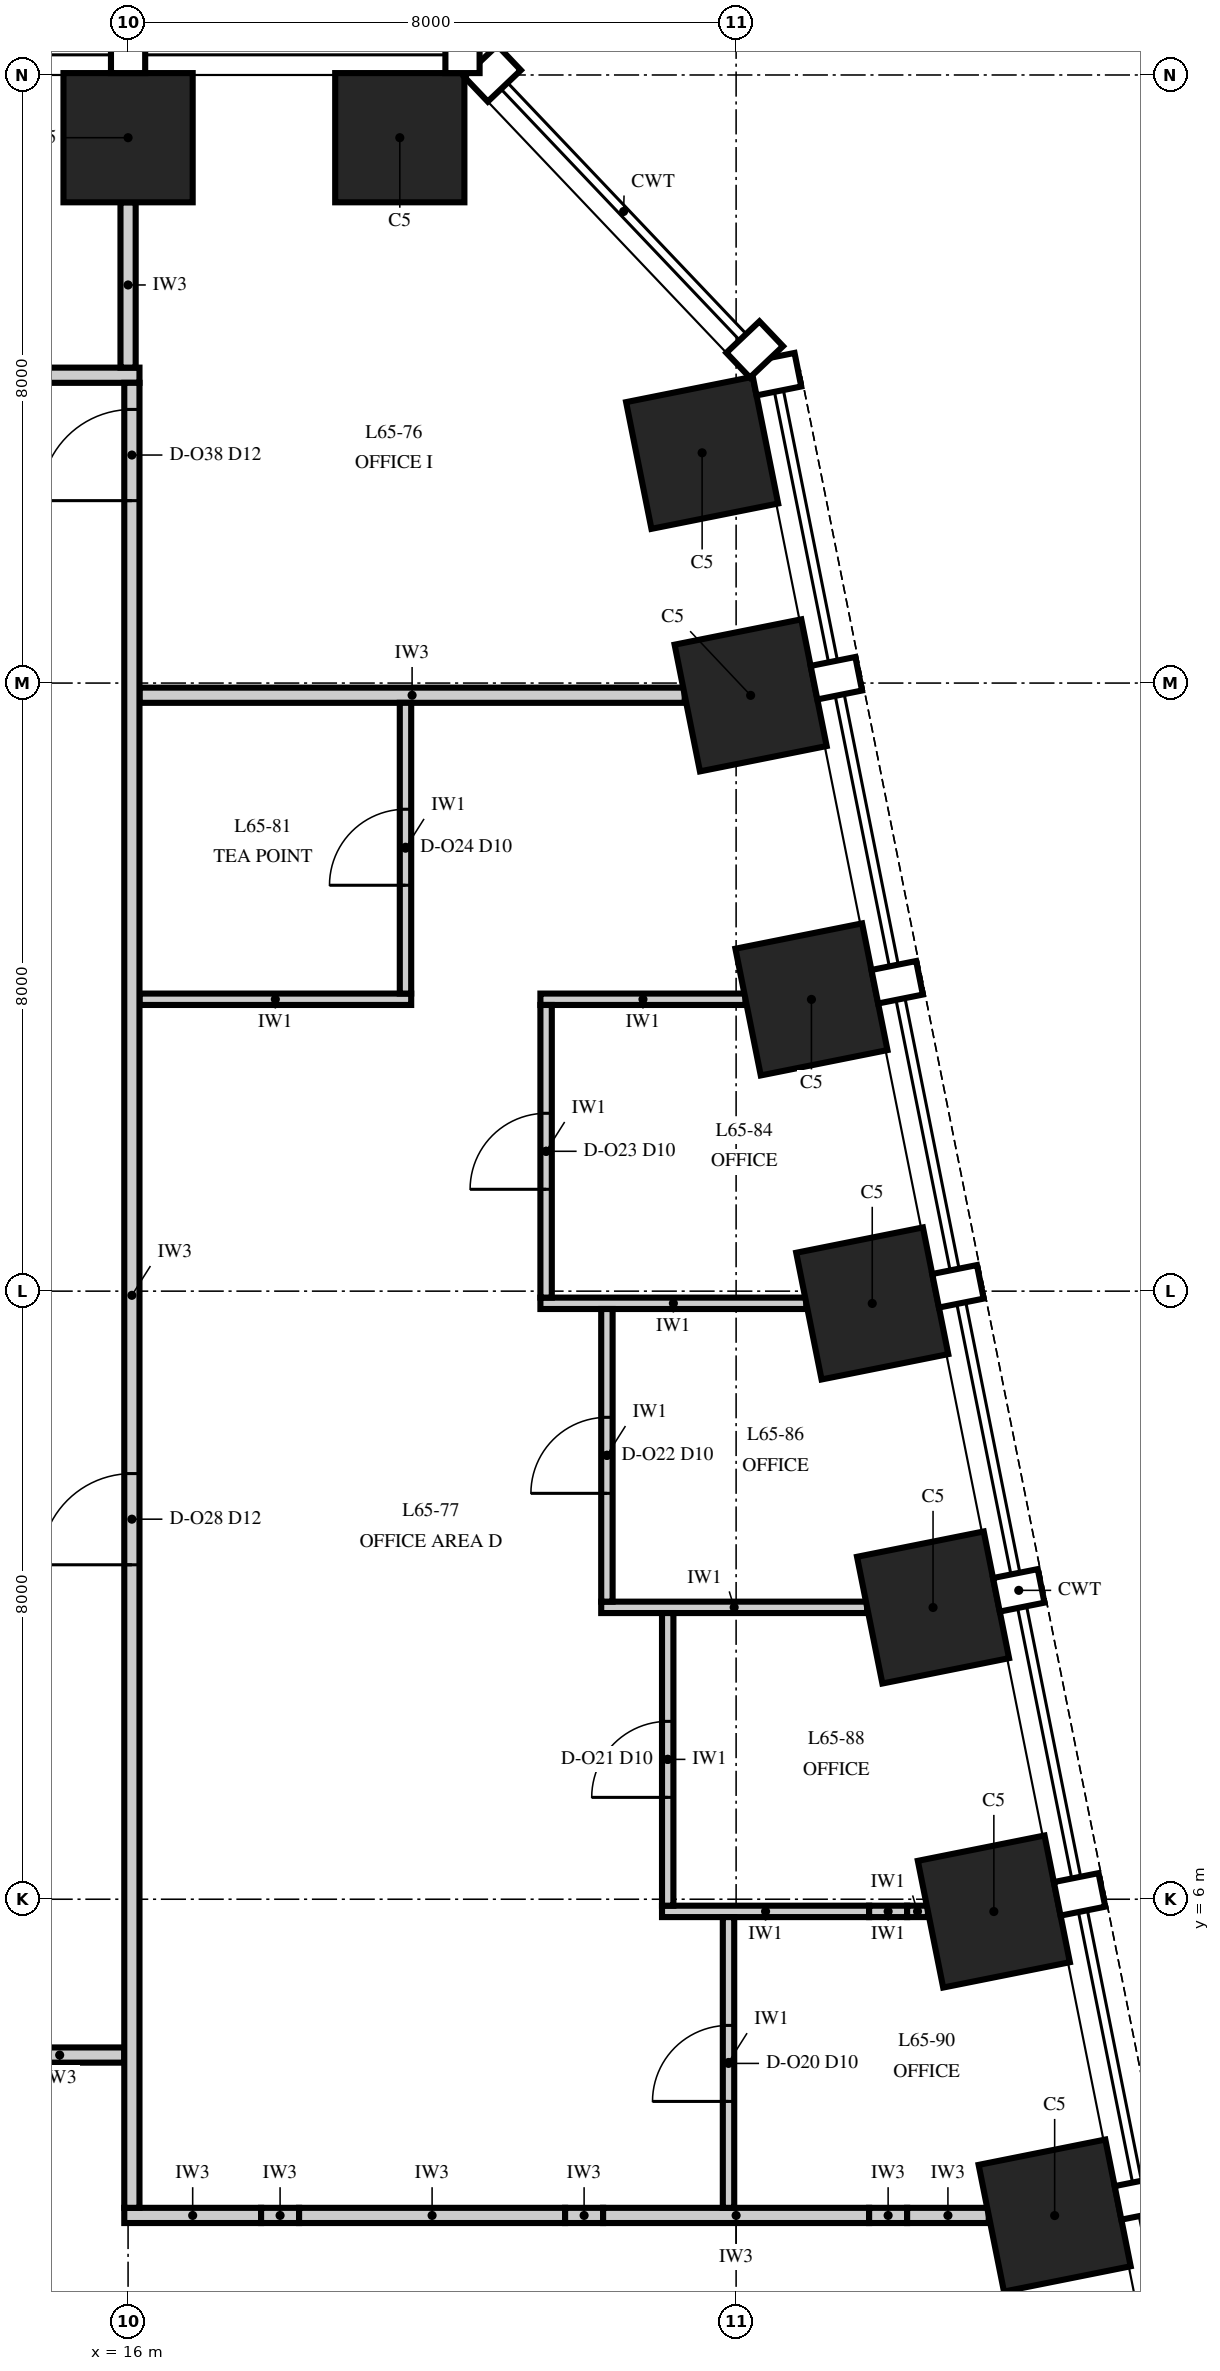
"""IFC4 building model, lengths in metres.
Left out: names, types, materials, properties, quantities, classifications, styles, units other than length and angle.
Written with IfcOpenShell. Run it as: python <this file> out.ifc"""

import sys

from ifc_helpers import new_model, si_unit, direction, frame, frame_2d, origin, origin_2d, place, context, subcontext, project, spatial, rectangle, extrude, element, fill, save


model = new_model("IFC4")
c1 = context("Model", 3, precision=1e-05, world=origin(), true_north=direction((0.0, 1.0)))
c2 = subcontext(c1, "Body", "Model", "MODEL_VIEW")
j1 = project(units=[si_unit("LENGTHUNIT", "METRE"), si_unit("PLANEANGLEUNIT", "RADIAN")], contexts=[c1])
p1 = place(None, origin())
s1 = spatial("IfcSite", under=j1, at=p1, CompositionType="ELEMENT")
p2 = place(p1, origin())
s2 = spatial("IfcBuilding", under=s1, at=p2, CompositionType="ELEMENT")
p3 = place(p2, frame((0.0, 0.0, 280.0)))
s3 = spatial("IfcBuildingStorey", under=s2, at=p3, CompositionType="ELEMENT", Elevation=280.0)
for number, where, z_axis, x_axis in (
    (1, (28.191, 1.838, 0.0), (0.0, 0.0, 1.0), (-0.196, 0.981, 0.0)),
    (2, (27.391, 5.838, 0.0), (0.0, 0.0, 1.0), (-0.196, 0.981, 0.0)),
    (3, (26.591, 9.838, 0.0), (0.0, 0.0, 1.0), (-0.196, 0.981, 0.0)),
    (4, (25.791, 13.838, 0.0), (0.0, 0.0, 1.0), (-0.196, 0.981, 0.0)),
    (5, (24.991, 17.838, 0.0), (0.0, 0.0, 1.0), (-0.196, 0.981, 0.0)),
    (6, (24.191, 21.838, 0.0), (0.0, 0.0, 1.0), (-0.196, 0.981, 0.0)),
    (7, (23.553, 25.029, 0.0), (0.0, 0.0, 1.0), (-0.196, 0.981, 0.0)),
    (8, (19.575, 29.175, 0.0), (0.0, 0.0, 1.0), (-1.0, 0.0, 0.0)),
    (9, (16.0, 29.175, 0.0), (0.0, 0.0, 1.0), (-1.0, 0.0, 0.0)),
):
    element("IfcColumn", number, at=place(p3, frame(where, z_axis=z_axis, x_axis=x_axis)), inside=s3, PredefinedType="COLUMN", context=c2, shape_type="SweptSolid", body=[
        extrude(rectangle(XDim=1.7, YDim=1.7, at=origin_2d()), origin(), (0.0, 0.0, 1.0), 4.0),
    ])
p4 = place(p3, frame((15.95, 1.84, 0.0), z_axis=(0.0, 0.0, 1.0), x_axis=(1.0, 0.0, 0.0)))
e10 = element("IfcWall", 10, at=p4, inside=s3, PredefinedType="PARTITIONING", context=c2, shape_type="SweptSolid", body=[
    extrude(rectangle(XDim=1.8, YDim=0.2, at=frame_2d((0.9, 0.0))), origin(), (0.0, 0.0, 1.0), 3.326),
])
p5 = place(p3, frame((17.75, 1.84, 0.0), z_axis=(0.0, 0.0, 1.0), x_axis=(1.0, 0.0, 0.0)))
e11 = element("IfcWall", 11, at=p5, inside=s3, PredefinedType="PARTITIONING", context=c2, shape_type="SweptSolid", body=[
    extrude(rectangle(XDim=0.5, YDim=0.2, at=frame_2d((0.25, 0.0))), origin(), (0.0, 0.0, 1.0), 2.25),
])
p6 = place(p3, frame((18.25, 1.84, 0.0), z_axis=(0.0, 0.0, 1.0), x_axis=(1.0, 0.0, 0.0)))
e12 = element("IfcWall", 12, at=p6, inside=s3, PredefinedType="PARTITIONING", context=c2, shape_type="SweptSolid", body=[
    extrude(rectangle(XDim=3.5, YDim=0.2, at=frame_2d((1.75, 0.0))), origin(), (0.0, 0.0, 1.0), 3.326),
])
p7 = place(p3, frame((21.75, 1.84, 0.0), z_axis=(0.0, 0.0, 1.0), x_axis=(1.0, 0.0, 0.0)))
e13 = element("IfcWall", 13, at=p7, inside=s3, PredefinedType="PARTITIONING", context=c2, shape_type="SweptSolid", body=[
    extrude(rectangle(XDim=0.5, YDim=0.2, at=frame_2d((0.25, 0.0))), origin(), (0.0, 0.0, 1.0), 2.25),
])
p8 = place(p3, frame((22.25, 1.84, 0.0), z_axis=(0.0, 0.0, 1.0), x_axis=(1.0, 0.0, 0.0)))
e14 = element("IfcWall", 14, at=p8, inside=s3, PredefinedType="PARTITIONING", context=c2, shape_type="SweptSolid", body=[
    extrude(rectangle(XDim=3.5, YDim=0.2, at=frame_2d((1.75, 0.0))), origin(), (0.0, 0.0, 1.0), 3.326),
])
p9 = place(p3, frame((25.75, 1.84, 0.0), z_axis=(0.0, 0.0, 1.0), x_axis=(1.0, 0.0, 0.0)))
e15 = element("IfcWall", 15, at=p9, inside=s3, PredefinedType="PARTITIONING", context=c2, shape_type="SweptSolid", body=[
    extrude(rectangle(XDim=0.5, YDim=0.2, at=frame_2d((0.25, 0.0))), origin(), (0.0, 0.0, 1.0), 2.25),
])
p10 = place(p3, frame((26.25, 1.84, 0.0), z_axis=(0.0, 0.0, 1.0), x_axis=(1.0, 0.0, 0.0)))
e16 = element("IfcWall", 16, at=p10, inside=s3, PredefinedType="PARTITIONING", context=c2, shape_type="SweptSolid", body=[
    extrude(rectangle(XDim=1.074, YDim=0.2, at=frame_2d((0.537, 0.0))), origin(), (0.0, 0.0, 1.0), 3.326),
])
p11 = place(p3, frame((14.25, 3.95, 0.0), z_axis=(0.0, 0.0, 1.0), x_axis=(1.0, 0.0, 0.0)))
e17 = element("IfcWall", 17, at=p11, inside=s3, PredefinedType="PARTITIONING", context=c2, shape_type="SweptSolid", body=[
    extrude(rectangle(XDim=1.7, YDim=0.2, at=frame_2d((0.85, 0.0))), origin(), (0.0, 0.0, 1.0), 3.85),
])
p12 = place(p3, frame((23.025, 5.84, 0.0), z_axis=(0.0, 0.0, 1.0), x_axis=(1.0, 0.0, 0.0)))
e18 = element("IfcWall", 18, at=p12, inside=s3, PredefinedType="PARTITIONING", context=c2, shape_type="SweptSolid", body=[
    extrude(rectangle(XDim=2.725, YDim=0.15, at=frame_2d((1.363, 0.0))), origin(), (0.0, 0.0, 1.0), 2.842),
])
p13 = place(p3, frame((25.75, 5.84, 0.0), z_axis=(0.0, 0.0, 1.0), x_axis=(1.0, 0.0, 0.0)))
e19 = element("IfcWall", 19, at=p13, inside=s3, PredefinedType="PARTITIONING", context=c2, shape_type="SweptSolid", body=[
    extrude(rectangle(XDim=0.5, YDim=0.15, at=frame_2d((0.25, 0.0))), origin(), (0.0, 0.0, 1.0), 2.25),
])
p14 = place(p3, frame((26.25, 5.84, 0.0), z_axis=(0.0, 0.0, 1.0), x_axis=(1.0, 0.0, 0.0)))
e20 = element("IfcWall", 20, at=p14, inside=s3, PredefinedType="PARTITIONING", context=c2, shape_type="SweptSolid", body=[
    extrude(rectangle(XDim=0.274, YDim=0.15, at=frame_2d((0.137, 0.0))), origin(), (0.0, 0.0, 1.0), 2.842),
])
for number, where, z_axis, x_axis in (
    (21, (22.225, 9.84, 0.0), (0.0, 0.0, 1.0), (1.0, 0.0, 0.0)),
    (22, (21.425, 13.84, 0.0), (0.0, 0.0, 1.0), (1.0, 0.0, 0.0)),
):
    element("IfcWall", number, at=place(p3, frame(where, z_axis=z_axis, x_axis=x_axis)), inside=s3, PredefinedType="PARTITIONING", context=c2, shape_type="SweptSolid", body=[
        extrude(rectangle(XDim=3.499, YDim=0.15, at=frame_2d((1.75, 0.0))), origin(), (0.0, 0.0, 1.0), 3.23),
    ])
p15 = place(p3, frame((16.15, 17.84, 0.0), z_axis=(0.0, 0.0, 1.0), x_axis=(1.0, 0.0, 0.0)))
e23 = element("IfcWall", 23, at=p15, inside=s3, PredefinedType="PARTITIONING", context=c2, shape_type="SweptSolid", body=[
    extrude(rectangle(XDim=3.575, YDim=0.15, at=frame_2d((1.788, 0.0))), origin(), (0.0, 0.0, 1.0), 3.23),
])
p16 = place(p3, frame((21.425, 17.84, 0.0), z_axis=(0.0, 0.0, 1.0), x_axis=(1.0, 0.0, 0.0)))
e24 = element("IfcWall", 24, at=p16, inside=s3, PredefinedType="PARTITIONING", context=c2, shape_type="SweptSolid", body=[
    extrude(rectangle(XDim=2.699, YDim=0.15, at=frame_2d((1.349, 0.0))), origin(), (0.0, 0.0, 1.0), 3.23),
])
p17 = place(p3, frame((16.15, 21.84, 0.0), z_axis=(0.0, 0.0, 1.0), x_axis=(1.0, 0.0, 0.0)))
e25 = element("IfcWall", 25, at=p17, inside=s3, PredefinedType="PARTITIONING", context=c2, shape_type="SweptSolid", body=[
    extrude(rectangle(XDim=7.174, YDim=0.2, at=frame_2d((3.587, 0.0))), origin(), (0.0, 0.0, 1.0), 3.23),
])
p18 = place(p3, frame((-16.15, 26.05, 0.0), z_axis=(0.0, 0.0, 1.0), x_axis=(1.0, 0.0, 0.0)))
e26 = element("IfcWall", 26, at=p18, inside=s3, PredefinedType="PARTITIONING", context=c2, shape_type="SweptSolid", body=[
    extrude(rectangle(XDim=32.3, YDim=0.2, at=frame_2d((16.15, 0.0))), origin(), (0.0, 0.0, 1.0), 3.418),
])
p19 = place(p18, frame((1.55, 0.0, 0.0)))
e27 = element("IfcOpeningElement", 27, at=p19, cuts=e26, PredefinedType="OPENING", context=c2, shape_type="SweptSolid", body=[
    extrude(rectangle(XDim=1.2, YDim=2.4, at=frame_2d((0.6, 1.2))), frame((0.0, 0.115, 0.0), z_axis=(0.0, -1.0, 0.0), x_axis=(1.0, 0.0, 0.0)), (0.0, 0.0, 1.0), 0.23),
])
p20 = place(p18, frame((5.55, 0.0, 0.0)))
e28 = element("IfcOpeningElement", 28, at=p20, cuts=e26, PredefinedType="OPENING", context=c2, shape_type="SweptSolid", body=[
    extrude(rectangle(XDim=1.2, YDim=2.4, at=frame_2d((0.6, 1.2))), frame((0.0, 0.115, 0.0), z_axis=(0.0, -1.0, 0.0), x_axis=(1.0, 0.0, 0.0)), (0.0, 0.0, 1.0), 0.23),
])
p21 = place(p18, frame((9.55, 0.0, 0.0)))
e29 = element("IfcOpeningElement", 29, at=p21, cuts=e26, PredefinedType="OPENING", context=c2, shape_type="SweptSolid", body=[
    extrude(rectangle(XDim=1.2, YDim=2.4, at=frame_2d((0.6, 1.2))), frame((0.0, 0.115, 0.0), z_axis=(0.0, -1.0, 0.0), x_axis=(1.0, 0.0, 0.0)), (0.0, 0.0, 1.0), 0.23),
])
p22 = place(p18, frame((13.55, 0.0, 0.0)))
e30 = element("IfcOpeningElement", 30, at=p22, cuts=e26, PredefinedType="OPENING", context=c2, shape_type="SweptSolid", body=[
    extrude(rectangle(XDim=1.2, YDim=2.4, at=frame_2d((0.6, 1.2))), frame((0.0, 0.115, 0.0), z_axis=(0.0, -1.0, 0.0), x_axis=(1.0, 0.0, 0.0)), (0.0, 0.0, 1.0), 0.23),
])
p23 = place(p18, frame((17.55, 0.0, 0.0)))
e31 = element("IfcOpeningElement", 31, at=p23, cuts=e26, PredefinedType="OPENING", context=c2, shape_type="SweptSolid", body=[
    extrude(rectangle(XDim=1.2, YDim=2.4, at=frame_2d((0.6, 1.2))), frame((0.0, 0.115, 0.0), z_axis=(0.0, -1.0, 0.0), x_axis=(1.0, 0.0, 0.0)), (0.0, 0.0, 1.0), 0.23),
])
p24 = place(p18, frame((21.55, 0.0, 0.0)))
e32 = element("IfcOpeningElement", 32, at=p24, cuts=e26, PredefinedType="OPENING", context=c2, shape_type="SweptSolid", body=[
    extrude(rectangle(XDim=1.2, YDim=2.4, at=frame_2d((0.6, 1.2))), frame((0.0, 0.115, 0.0), z_axis=(0.0, -1.0, 0.0), x_axis=(1.0, 0.0, 0.0)), (0.0, 0.0, 1.0), 0.23),
])
p25 = place(p18, frame((25.55, 0.0, 0.0)))
e33 = element("IfcOpeningElement", 33, at=p25, cuts=e26, PredefinedType="OPENING", context=c2, shape_type="SweptSolid", body=[
    extrude(rectangle(XDim=1.2, YDim=2.4, at=frame_2d((0.6, 1.2))), frame((0.0, 0.115, 0.0), z_axis=(0.0, -1.0, 0.0), x_axis=(1.0, 0.0, 0.0)), (0.0, 0.0, 1.0), 0.23),
])
p26 = place(p18, frame((29.55, 0.0, 0.0)))
e34 = element("IfcOpeningElement", 34, at=p26, cuts=e26, PredefinedType="OPENING", context=c2, shape_type="SweptSolid", body=[
    extrude(rectangle(XDim=1.2, YDim=2.4, at=frame_2d((0.6, 1.2))), frame((0.0, 0.115, 0.0), z_axis=(0.0, -1.0, 0.0), x_axis=(1.0, 0.0, 0.0)), (0.0, 0.0, 1.0), 0.23),
])
p27 = place(p3, frame((16.0, 26.15, 0.0), z_axis=(0.0, 0.0, 1.0), x_axis=(0.0, 1.0, 0.0)))
e35 = element("IfcWall", 35, at=p27, inside=s3, PredefinedType="PARTITIONING", context=c2, shape_type="SweptSolid", body=[
    extrude(rectangle(XDim=2.175, YDim=0.2, at=frame_2d((1.087, 0.0))), origin(), (0.0, 0.0, 1.0), 3.418),
])
p28 = place(p3, frame((16.05, 1.94, 0.0), z_axis=(0.0, 0.0, 1.0), x_axis=(0.0, 1.0, 0.0)))
e36 = element("IfcWall", 36, at=p28, inside=s3, PredefinedType="PARTITIONING", context=c2, shape_type="SweptSolid", body=[
    extrude(rectangle(XDim=24.01, YDim=0.2, at=frame_2d((12.005, 0.0))), origin(), (0.0, 0.0, 1.0), 2.842),
])
p29 = place(p28, frame((8.46, 0.0, 0.0)))
e37 = element("IfcOpeningElement", 37, at=p29, cuts=e36, PredefinedType="OPENING", context=c2, shape_type="SweptSolid", body=[
    extrude(rectangle(XDim=1.2, YDim=2.4, at=frame_2d((0.6, 1.2))), frame((0.0, 0.115, 0.0), z_axis=(0.0, -1.0, 0.0), x_axis=(1.0, 0.0, 0.0)), (0.0, 0.0, 1.0), 0.23),
])
p30 = place(p28, frame((22.46, 0.0, 0.0)))
e38 = element("IfcOpeningElement", 38, at=p30, cuts=e36, PredefinedType="OPENING", context=c2, shape_type="SweptSolid", body=[
    extrude(rectangle(XDim=1.2, YDim=2.4, at=frame_2d((0.6, 1.2))), frame((0.0, 0.115, 0.0), z_axis=(0.0, -1.0, 0.0), x_axis=(1.0, 0.0, 0.0)), (0.0, 0.0, 1.0), 0.23),
])
p31 = place(p3, frame((19.65, 17.915, 0.0), z_axis=(0.0, 0.0, 1.0), x_axis=(0.0, 1.0, 0.0)))
e39 = element("IfcWall", 39, at=p31, inside=s3, PredefinedType="PARTITIONING", context=c2, shape_type="SweptSolid", body=[
    extrude(rectangle(XDim=3.825, YDim=0.15, at=frame_2d((1.913, 0.0))), origin(), (0.0, 0.0, 1.0), 3.23),
])
p32 = place(p31, frame((1.425, 0.0, 0.0)))
e40 = element("IfcOpeningElement", 40, at=p32, cuts=e39, PredefinedType="OPENING", context=c2, shape_type="SweptSolid", body=[
    extrude(rectangle(XDim=1.0, YDim=2.3, at=frame_2d((0.5, 1.15))), frame((0.0, 0.09, 0.0), z_axis=(0.0, -1.0, 0.0), x_axis=(1.0, 0.0, 0.0)), (0.0, 0.0, 1.0), 0.18),
])
p33 = place(p3, frame((21.5, 13.915, 0.0), z_axis=(0.0, 0.0, 1.0), x_axis=(0.0, 1.0, 0.0)))
e41 = element("IfcWall", 41, at=p33, inside=s3, PredefinedType="PARTITIONING", context=c2, shape_type="SweptSolid", body=[
    extrude(rectangle(XDim=3.85, YDim=0.15, at=frame_2d((1.925, 0.0))), origin(), (0.0, 0.0, 1.0), 3.23),
])
p34 = place(p33, frame((1.425, 0.0, 0.0)))
e42 = element("IfcOpeningElement", 42, at=p34, cuts=e41, PredefinedType="OPENING", context=c2, shape_type="SweptSolid", body=[
    extrude(rectangle(XDim=1.0, YDim=2.3, at=frame_2d((0.5, 1.15))), frame((0.0, 0.09, 0.0), z_axis=(0.0, -1.0, 0.0), x_axis=(1.0, 0.0, 0.0)), (0.0, 0.0, 1.0), 0.18),
])
p35 = place(p3, frame((22.3, 9.915, 0.0), z_axis=(0.0, 0.0, 1.0), x_axis=(0.0, 1.0, 0.0)))
e43 = element("IfcWall", 43, at=p35, inside=s3, PredefinedType="PARTITIONING", context=c2, shape_type="SweptSolid", body=[
    extrude(rectangle(XDim=3.85, YDim=0.15, at=frame_2d((1.925, 0.0))), origin(), (0.0, 0.0, 1.0), 3.85),
])
p36 = place(p35, frame((1.425, 0.0, 0.0)))
e44 = element("IfcOpeningElement", 44, at=p36, cuts=e43, PredefinedType="OPENING", context=c2, shape_type="SweptSolid", body=[
    extrude(rectangle(XDim=1.0, YDim=2.3, at=frame_2d((0.5, 1.15))), frame((0.0, 0.09, 0.0), z_axis=(0.0, -1.0, 0.0), x_axis=(1.0, 0.0, 0.0)), (0.0, 0.0, 1.0), 0.18),
])
p37 = place(p3, frame((23.1, 5.915, 0.0), z_axis=(0.0, 0.0, 1.0), x_axis=(0.0, 1.0, 0.0)))
e45 = element("IfcWall", 45, at=p37, inside=s3, PredefinedType="PARTITIONING", context=c2, shape_type="SweptSolid", body=[
    extrude(rectangle(XDim=3.85, YDim=0.15, at=frame_2d((1.925, 0.0))), origin(), (0.0, 0.0, 1.0), 2.842),
])
p38 = place(p37, frame((1.425, 0.0, 0.0)))
e46 = element("IfcOpeningElement", 46, at=p38, cuts=e45, PredefinedType="OPENING", context=c2, shape_type="SweptSolid", body=[
    extrude(rectangle(XDim=1.0, YDim=2.3, at=frame_2d((0.5, 1.15))), frame((0.0, 0.09, 0.0), z_axis=(0.0, -1.0, 0.0), x_axis=(1.0, 0.0, 0.0)), (0.0, 0.0, 1.0), 0.18),
])
p39 = place(p3, frame((23.9, 1.94, 0.0), z_axis=(0.0, 0.0, 1.0), x_axis=(0.0, 1.0, 0.0)))
e47 = element("IfcWall", 47, at=p39, inside=s3, PredefinedType="PARTITIONING", context=c2, shape_type="SweptSolid", body=[
    extrude(rectangle(XDim=3.825, YDim=0.15, at=frame_2d((1.913, 0.0))), origin(), (0.0, 0.0, 1.0), 3.85),
])
p40 = place(p39, frame((1.4, 0.0, 0.0)))
e48 = element("IfcOpeningElement", 48, at=p40, cuts=e47, PredefinedType="OPENING", context=c2, shape_type="SweptSolid", body=[
    extrude(rectangle(XDim=1.0, YDim=2.3, at=frame_2d((0.5, 1.15))), frame((0.0, 0.09, 0.0), z_axis=(0.0, -1.0, 0.0), x_axis=(1.0, 0.0, 0.0)), (0.0, 0.0, 1.0), 0.18),
])
p41 = place(p40, origin())
e49 = element("IfcDoor", 49, at=p41, inside=s3, OperationType="SINGLE_SWING_LEFT", PredefinedType="DOOR", context=c2, shape_type="SweptSolid", body=[
    extrude(rectangle(XDim=1.0, YDim=2.3, at=frame_2d((0.5, 1.15))), frame((0.0, 0.075, 0.0), z_axis=(0.0, -1.0, 0.0), x_axis=(1.0, 0.0, 0.0)), (0.0, 0.0, 1.0), 0.149),
])
fill(e48, e49)
p42 = place(p38, origin())
e50 = element("IfcDoor", 50, at=p42, inside=s3, OperationType="SINGLE_SWING_LEFT", PredefinedType="DOOR", context=c2, shape_type="SweptSolid", body=[
    extrude(rectangle(XDim=1.0, YDim=2.3, at=frame_2d((0.5, 1.15))), frame((0.0, 0.075, 0.0), z_axis=(0.0, -1.0, 0.0), x_axis=(1.0, 0.0, 0.0)), (0.0, 0.0, 1.0), 0.149),
])
fill(e46, e50)
p43 = place(p36, origin())
e51 = element("IfcDoor", 51, at=p43, inside=s3, OperationType="SINGLE_SWING_LEFT", PredefinedType="DOOR", context=c2, shape_type="SweptSolid", body=[
    extrude(rectangle(XDim=1.0, YDim=2.3, at=frame_2d((0.5, 1.15))), frame((0.0, 0.075, 0.0), z_axis=(0.0, -1.0, 0.0), x_axis=(1.0, 0.0, 0.0)), (0.0, 0.0, 1.0), 0.149),
])
fill(e44, e51)
p44 = place(p34, origin())
e52 = element("IfcDoor", 52, at=p44, inside=s3, OperationType="SINGLE_SWING_LEFT", PredefinedType="DOOR", context=c2, shape_type="SweptSolid", body=[
    extrude(rectangle(XDim=1.0, YDim=2.3, at=frame_2d((0.5, 1.15))), frame((0.0, 0.075, 0.0), z_axis=(0.0, -1.0, 0.0), x_axis=(1.0, 0.0, 0.0)), (0.0, 0.0, 1.0), 0.149),
])
fill(e42, e52)
p45 = place(p32, origin())
e53 = element("IfcDoor", 53, at=p45, inside=s3, OperationType="SINGLE_SWING_LEFT", PredefinedType="DOOR", context=c2, shape_type="SweptSolid", body=[
    extrude(rectangle(XDim=1.0, YDim=2.3, at=frame_2d((0.5, 1.15))), frame((0.0, 0.075, 0.0), z_axis=(0.0, -1.0, 0.0), x_axis=(1.0, 0.0, 0.0)), (0.0, 0.0, 1.0), 0.149),
])
fill(e40, e53)
p46 = place(p29, origin())
e54 = element("IfcDoor", 54, at=p46, inside=s3, OperationType="SINGLE_SWING_LEFT", PredefinedType="DOOR", context=c2, shape_type="SweptSolid", body=[
    extrude(rectangle(XDim=1.2, YDim=2.4, at=frame_2d((0.6, 1.2))), frame((0.0, 0.1, 0.0), z_axis=(0.0, -1.0, 0.0), x_axis=(1.0, 0.0, 0.0)), (0.0, 0.0, 1.0), 0.199),
])
fill(e37, e54)
p47 = place(p30, origin())
e55 = element("IfcDoor", 55, at=p47, inside=s3, OperationType="SINGLE_SWING_LEFT", PredefinedType="DOOR", context=c2, shape_type="SweptSolid", body=[
    extrude(rectangle(XDim=1.2, YDim=2.4, at=frame_2d((0.6, 1.2))), frame((0.0, 0.1, 0.0), z_axis=(0.0, -1.0, 0.0), x_axis=(1.0, 0.0, 0.0)), (0.0, 0.0, 1.0), 0.199),
])
fill(e38, e55)
save(model, sys.argv[1])
